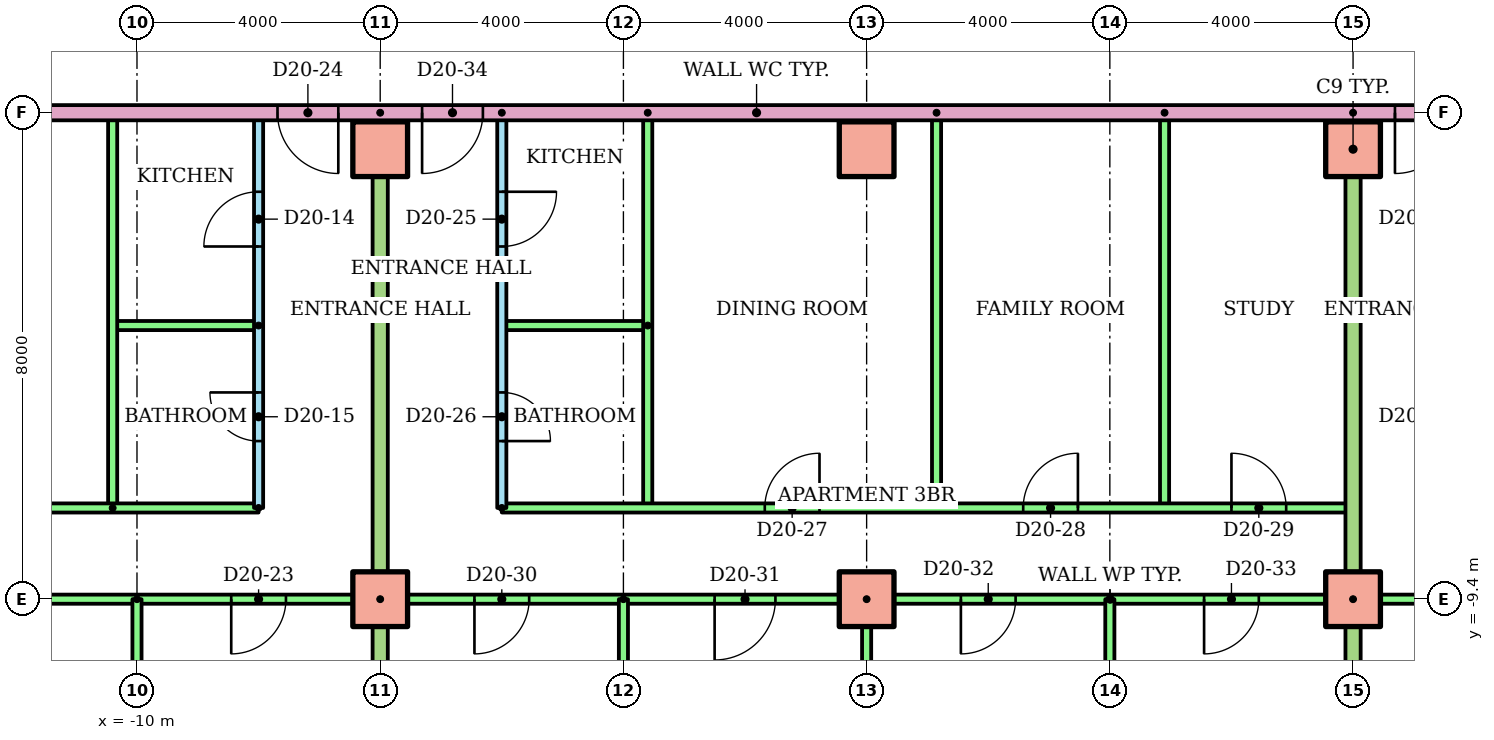
"""IFC4 building model, lengths in metres.
Left out: names, types, materials, properties, quantities, classifications, styles, units other than length and angle.
Written with IfcOpenShell. Run it as: python <this file> out.ifc"""

import sys

from ifc_helpers import new_model, si_unit, direction, frame, frame_2d, origin, origin_2d, place, context, subcontext, project, spatial, rectangle, extrude, element, fill, save


model = new_model("IFC4")
c1 = context("Model", 3, precision=1e-05, world=origin(), true_north=direction((0.0, 1.0)))
c2 = subcontext(c1, "Body", "Model", "MODEL_VIEW")
j1 = project(units=[si_unit("LENGTHUNIT", "METRE"), si_unit("PLANEANGLEUNIT", "RADIAN")], contexts=[c1])
p1 = place(None, origin())
s1 = spatial("IfcSite", under=j1, at=p1, CompositionType="ELEMENT")
p2 = place(p1, origin())
s2 = spatial("IfcBuilding", under=s1, at=p2, CompositionType="ELEMENT")
p3 = place(p2, frame((0.0, 0.0, 80.7)))
s3 = spatial("IfcBuildingStorey", under=s2, at=p3, CompositionType="ELEMENT", Elevation=80.7)
for number, where in (
    (1, (-6.0, -9.4, 0.0)),
    (2, (2.0, -9.4, 0.0)),
    (3, (10.0, -9.4, 0.0)),
    (4, (-6.0, -2.0, 0.0)),
    (5, (2.0, -2.0, 0.0)),
    (6, (10.0, -2.0, 0.0)),
):
    element("IfcColumn", number, at=place(p3, frame(where)), inside=s3, PredefinedType="COLUMN", context=c2, shape_type="SweptSolid", body=[
        extrude(rectangle(XDim=0.9, YDim=0.9, at=origin_2d()), origin(), (0.0, 0.0, 1.0), 3.2),
    ])
p4 = place(p3, frame((-8.0, -7.9, 0.0), z_axis=(0.0, 0.0, 1.0), x_axis=(0.0, 1.0, 0.0)))
e7 = element("IfcWall", 7, at=p4, inside=s3, PredefinedType="PARTITIONING", context=c2, shape_type="SweptSolid", body=[
    extrude(rectangle(XDim=6.5, YDim=0.15, at=frame_2d((3.25, 0.0))), origin(), (0.0, 0.0, 1.0), 2.4),
])
p5 = place(p4, frame((4.3, 0.0, 0.0)))
e8 = element("IfcOpeningElement", 8, at=p5, cuts=e7, PredefinedType="OPENING", context=c2, shape_type="SweptSolid", body=[
    extrude(rectangle(XDim=0.9, YDim=2.1, at=frame_2d((0.45, 1.05))), frame((0.0, 0.085, 0.0), z_axis=(0.0, -1.0, 0.0), x_axis=(1.0, 0.0, 0.0)), (0.0, 0.0, 1.0), 0.17),
])
p6 = place(p4, frame((1.1, 0.0, 0.0)))
e9 = element("IfcOpeningElement", 9, at=p6, cuts=e7, PredefinedType="OPENING", context=c2, shape_type="SweptSolid", body=[
    extrude(rectangle(XDim=0.8, YDim=2.1, at=frame_2d((0.4, 1.05))), frame((0.0, 0.085, 0.0), z_axis=(0.0, -1.0, 0.0), x_axis=(1.0, 0.0, 0.0)), (0.0, 0.0, 1.0), 0.17),
])
p7 = place(p3, frame((-8.0, -4.9, 0.0), z_axis=(0.0, 0.0, 1.0), x_axis=(-1.0, 0.0, 0.0)))
e10 = element("IfcWall", 10, at=p7, inside=s3, PredefinedType="PARTITIONING", context=c2, shape_type="SweptSolid", body=[
    extrude(rectangle(XDim=2.4, YDim=0.15, at=frame_2d((1.2, 0.0))), origin(), (0.0, 0.0, 1.0), 2.4),
])
p8 = place(p3, frame((-10.4, -7.9, 0.0), z_axis=(0.0, 0.0, 1.0), x_axis=(0.0, 1.0, 0.0)))
e11 = element("IfcWall", 11, at=p8, inside=s3, PredefinedType="PARTITIONING", context=c2, shape_type="SweptSolid", body=[
    extrude(rectangle(XDim=6.5, YDim=0.15, at=frame_2d((3.25, 0.0))), origin(), (0.0, 0.0, 1.0), 2.4),
])
p9 = place(p3, frame((-28.61, -7.9, 0.0)))
e12 = element("IfcWall", 12, at=p9, inside=s3, PredefinedType="PARTITIONING", context=c2, shape_type="SweptSolid", body=[
    extrude(rectangle(XDim=20.61, YDim=0.15, at=frame_2d((10.305, 0.0))), origin(), (0.0, 0.0, 1.0), 2.4),
])
p10 = place(p9, frame((13.021, 0.0, 0.0)))
e13 = element("IfcOpeningElement", 13, at=p10, cuts=e12, PredefinedType="OPENING", context=c2, shape_type="SweptSolid", body=[
    extrude(rectangle(XDim=0.9, YDim=2.1, at=frame_2d((0.45, 1.05))), frame((0.0, 0.085, 0.0), z_axis=(0.0, -1.0, 0.0), x_axis=(1.0, 0.0, 0.0)), (0.0, 0.0, 1.0), 0.17),
])
p11 = place(p9, frame((7.299, 0.0, 0.0)))
e14 = element("IfcOpeningElement", 14, at=p11, cuts=e12, PredefinedType="OPENING", context=c2, shape_type="SweptSolid", body=[
    extrude(rectangle(XDim=0.9, YDim=2.1, at=frame_2d((0.45, 1.05))), frame((0.0, 0.085, 0.0), z_axis=(0.0, -1.0, 0.0), x_axis=(1.0, 0.0, 0.0)), (0.0, 0.0, 1.0), 0.17),
])
p12 = place(p9, frame((2.01, 0.0, 0.0)))
e15 = element("IfcOpeningElement", 15, at=p12, cuts=e12, PredefinedType="OPENING", context=c2, shape_type="SweptSolid", body=[
    extrude(rectangle(XDim=0.9, YDim=2.1, at=frame_2d((0.45, 1.05))), frame((0.0, 0.085, 0.0), z_axis=(0.0, -1.0, 0.0), x_axis=(1.0, 0.0, 0.0)), (0.0, 0.0, 1.0), 0.17),
])
p13 = place(p3, frame((-6.0, -9.4, 0.0), z_axis=(0.0, 0.0, 1.0), x_axis=(-1.0, 0.0, 0.0)))
e16 = element("IfcWall", 16, at=p13, inside=s3, PredefinedType="PARTITIONING", context=c2, shape_type="SweptSolid", body=[
    extrude(rectangle(XDim=22.61, YDim=0.15, at=frame_2d((11.305, 0.0))), origin(), (0.0, 0.0, 1.0), 2.4),
])
p14 = place(p13, frame((19.7, 0.0, 0.0)))
e17 = element("IfcOpeningElement", 17, at=p14, cuts=e16, PredefinedType="OPENING", context=c2, shape_type="SweptSolid", body=[
    extrude(rectangle(XDim=0.9, YDim=2.1, at=frame_2d((0.45, 1.05))), frame((0.0, 0.085, 0.0), z_axis=(0.0, -1.0, 0.0), x_axis=(1.0, 0.0, 0.0)), (0.0, 0.0, 1.0), 0.17),
])
p15 = place(p13, frame((14.411, 0.0, 0.0)))
e18 = element("IfcOpeningElement", 18, at=p15, cuts=e16, PredefinedType="OPENING", context=c2, shape_type="SweptSolid", body=[
    extrude(rectangle(XDim=0.9, YDim=2.1, at=frame_2d((0.45, 1.05))), frame((0.0, 0.085, 0.0), z_axis=(0.0, -1.0, 0.0), x_axis=(1.0, 0.0, 0.0)), (0.0, 0.0, 1.0), 0.17),
])
p16 = place(p13, frame((9.5, 0.0, 0.0)))
e19 = element("IfcOpeningElement", 19, at=p16, cuts=e16, PredefinedType="OPENING", context=c2, shape_type="SweptSolid", body=[
    extrude(rectangle(XDim=1.0, YDim=2.1, at=frame_2d((0.5, 1.05))), frame((0.0, 0.085, 0.0), z_axis=(0.0, -1.0, 0.0), x_axis=(1.0, 0.0, 0.0)), (0.0, 0.0, 1.0), 0.17),
])
p17 = place(p13, frame((5.55, 0.0, 0.0)))
e20 = element("IfcOpeningElement", 20, at=p17, cuts=e16, PredefinedType="OPENING", context=c2, shape_type="SweptSolid", body=[
    extrude(rectangle(XDim=0.9, YDim=2.1, at=frame_2d((0.45, 1.05))), frame((0.0, 0.085, 0.0), z_axis=(0.0, -1.0, 0.0), x_axis=(1.0, 0.0, 0.0)), (0.0, 0.0, 1.0), 0.17),
])
p18 = place(p13, frame((1.55, 0.0, 0.0)))
e21 = element("IfcOpeningElement", 21, at=p18, cuts=e16, PredefinedType="OPENING", context=c2, shape_type="SweptSolid", body=[
    extrude(rectangle(XDim=0.9, YDim=2.1, at=frame_2d((0.45, 1.05))), frame((0.0, 0.085, 0.0), z_axis=(0.0, -1.0, 0.0), x_axis=(1.0, 0.0, 0.0)), (0.0, 0.0, 1.0), 0.17),
])
p19 = place(p3, frame((-10.0, -9.4, 0.0), z_axis=(0.0, 0.0, 1.0), x_axis=(0.0, -1.0, 0.0)))
e22 = element("IfcWall", 22, at=p19, inside=s3, PredefinedType="PARTITIONING", context=c2, shape_type="SweptSolid", body=[
    extrude(rectangle(XDim=6.821, YDim=0.15, at=frame_2d((3.411, 0.0))), origin(), (0.0, 0.0, 1.0), 2.4),
])
p20 = place(p3, frame((-4.0, -1.4, 0.0), z_axis=(0.0, 0.0, 1.0), x_axis=(0.0, -1.0, 0.0)))
e23 = element("IfcWall", 23, at=p20, inside=s3, PredefinedType="PARTITIONING", context=c2, shape_type="SweptSolid", body=[
    extrude(rectangle(XDim=6.5, YDim=0.15, at=frame_2d((3.25, 0.0))), origin(), (0.0, 0.0, 1.0), 2.4),
])
p21 = place(p20, frame((1.3, 0.0, 0.0)))
e24 = element("IfcOpeningElement", 24, at=p21, cuts=e23, PredefinedType="OPENING", context=c2, shape_type="SweptSolid", body=[
    extrude(rectangle(XDim=0.9, YDim=2.1, at=frame_2d((0.45, 1.05))), frame((0.0, 0.085, 0.0), z_axis=(0.0, -1.0, 0.0), x_axis=(1.0, 0.0, 0.0)), (0.0, 0.0, 1.0), 0.17),
])
p22 = place(p20, frame((4.6, 0.0, 0.0)))
e25 = element("IfcOpeningElement", 25, at=p22, cuts=e23, PredefinedType="OPENING", context=c2, shape_type="SweptSolid", body=[
    extrude(rectangle(XDim=0.8, YDim=2.1, at=frame_2d((0.4, 1.05))), frame((0.0, 0.085, 0.0), z_axis=(0.0, -1.0, 0.0), x_axis=(1.0, 0.0, 0.0)), (0.0, 0.0, 1.0), 0.17),
])
p23 = place(p3, frame((-1.6, -4.9, 0.0), z_axis=(0.0, 0.0, 1.0), x_axis=(-1.0, 0.0, 0.0)))
e26 = element("IfcWall", 26, at=p23, inside=s3, PredefinedType="PARTITIONING", context=c2, shape_type="SweptSolid", body=[
    extrude(rectangle(XDim=2.4, YDim=0.15, at=frame_2d((1.2, 0.0))), origin(), (0.0, 0.0, 1.0), 2.4),
])
for number, where, z_axis, x_axis in (
    (27, (-1.6, -1.4, 0.0), (0.0, 0.0, 1.0), (0.0, -1.0, 0.0)),
    (28, (3.15, -1.4, 0.0), (0.0, 0.0, 1.0), (0.0, -1.0, 0.0)),
    (29, (6.9, -1.4, 0.0), (0.0, 0.0, 1.0), (0.0, -1.0, 0.0)),
):
    element("IfcWall", number, at=place(p3, frame(where, z_axis=z_axis, x_axis=x_axis)), inside=s3, PredefinedType="PARTITIONING", context=c2, shape_type="SweptSolid", body=[
        extrude(rectangle(XDim=6.5, YDim=0.15, at=frame_2d((3.25, 0.0))), origin(), (0.0, 0.0, 1.0), 2.4),
    ])
p24 = place(p3, frame((-4.0, -7.9, 0.0)))
e30 = element("IfcWall", 30, at=p24, inside=s3, PredefinedType="PARTITIONING", context=c2, shape_type="SweptSolid", body=[
    extrude(rectangle(XDim=14.0, YDim=0.15, at=frame_2d((7.0, 0.0))), origin(), (0.0, 0.0, 1.0), 2.4),
])
p25 = place(p24, frame((4.325, 0.0, 0.0)))
e31 = element("IfcOpeningElement", 31, at=p25, cuts=e30, PredefinedType="OPENING", context=c2, shape_type="SweptSolid", body=[
    extrude(rectangle(XDim=0.9, YDim=2.1, at=frame_2d((0.45, 1.05))), frame((0.0, 0.085, 0.0), z_axis=(0.0, -1.0, 0.0), x_axis=(1.0, 0.0, 0.0)), (0.0, 0.0, 1.0), 0.17),
])
p26 = place(p24, frame((8.575, 0.0, 0.0)))
e32 = element("IfcOpeningElement", 32, at=p26, cuts=e30, PredefinedType="OPENING", context=c2, shape_type="SweptSolid", body=[
    extrude(rectangle(XDim=0.9, YDim=2.1, at=frame_2d((0.45, 1.05))), frame((0.0, 0.085, 0.0), z_axis=(0.0, -1.0, 0.0), x_axis=(1.0, 0.0, 0.0)), (0.0, 0.0, 1.0), 0.17),
])
p27 = place(p24, frame((12.0, 0.0, 0.0)))
e33 = element("IfcOpeningElement", 33, at=p27, cuts=e30, PredefinedType="OPENING", context=c2, shape_type="SweptSolid", body=[
    extrude(rectangle(XDim=0.9, YDim=2.1, at=frame_2d((0.45, 1.05))), frame((0.0, 0.085, 0.0), z_axis=(0.0, -1.0, 0.0), x_axis=(1.0, 0.0, 0.0)), (0.0, 0.0, 1.0), 0.17),
])
p28 = place(p3, frame((10.0, -9.4, 0.0), z_axis=(0.0, 0.0, 1.0), x_axis=(-1.0, 0.0, 0.0)))
e34 = element("IfcWall", 34, at=p28, inside=s3, PredefinedType="PARTITIONING", context=c2, shape_type="SweptSolid", body=[
    extrude(rectangle(XDim=16.0, YDim=0.15, at=frame_2d((8.0, 0.0))), origin(), (0.0, 0.0, 1.0), 2.4),
])
p29 = place(p28, frame((13.55, 0.0, 0.0)))
e35 = element("IfcOpeningElement", 35, at=p29, cuts=e34, PredefinedType="OPENING", context=c2, shape_type="SweptSolid", body=[
    extrude(rectangle(XDim=0.9, YDim=2.1, at=frame_2d((0.45, 1.05))), frame((0.0, 0.085, 0.0), z_axis=(0.0, -1.0, 0.0), x_axis=(1.0, 0.0, 0.0)), (0.0, 0.0, 1.0), 0.17),
])
p30 = place(p28, frame((9.5, 0.0, 0.0)))
e36 = element("IfcOpeningElement", 36, at=p30, cuts=e34, PredefinedType="OPENING", context=c2, shape_type="SweptSolid", body=[
    extrude(rectangle(XDim=1.0, YDim=2.1, at=frame_2d((0.5, 1.05))), frame((0.0, 0.085, 0.0), z_axis=(0.0, -1.0, 0.0), x_axis=(1.0, 0.0, 0.0)), (0.0, 0.0, 1.0), 0.17),
])
p31 = place(p28, frame((5.55, 0.0, 0.0)))
e37 = element("IfcOpeningElement", 37, at=p31, cuts=e34, PredefinedType="OPENING", context=c2, shape_type="SweptSolid", body=[
    extrude(rectangle(XDim=0.9, YDim=2.1, at=frame_2d((0.45, 1.05))), frame((0.0, 0.085, 0.0), z_axis=(0.0, -1.0, 0.0), x_axis=(1.0, 0.0, 0.0)), (0.0, 0.0, 1.0), 0.17),
])
p32 = place(p28, frame((1.55, 0.0, 0.0)))
e38 = element("IfcOpeningElement", 38, at=p32, cuts=e34, PredefinedType="OPENING", context=c2, shape_type="SweptSolid", body=[
    extrude(rectangle(XDim=0.9, YDim=2.1, at=frame_2d((0.45, 1.05))), frame((0.0, 0.085, 0.0), z_axis=(0.0, -1.0, 0.0), x_axis=(1.0, 0.0, 0.0)), (0.0, 0.0, 1.0), 0.17),
])
p33 = place(p3, frame((-2.0, -9.4, 0.0), z_axis=(0.0, 0.0, 1.0), x_axis=(0.0, -1.0, 0.0)))
e39 = element("IfcWall", 39, at=p33, inside=s3, PredefinedType="PARTITIONING", context=c2, shape_type="SweptSolid", body=[
    extrude(rectangle(XDim=6.821, YDim=0.15, at=frame_2d((3.411, 0.0))), origin(), (0.0, 0.0, 1.0), 2.4),
])
p34 = place(p3, frame((2.0, -9.4, 0.0), z_axis=(0.0, 0.0, 1.0), x_axis=(0.0, -1.0, 0.0)))
e40 = element("IfcWall", 40, at=p34, inside=s3, PredefinedType="PARTITIONING", context=c2, shape_type="SweptSolid", body=[
    extrude(rectangle(XDim=6.81, YDim=0.15, at=frame_2d((3.405, 0.0))), origin(), (0.0, 0.0, 1.0), 2.4),
])
p35 = place(p3, frame((6.0, -9.4, 0.0), z_axis=(0.0, 0.0, 1.0), x_axis=(0.0, -1.0, 0.0)))
e41 = element("IfcWall", 41, at=p35, inside=s3, PredefinedType="PARTITIONING", context=c2, shape_type="SweptSolid", body=[
    extrude(rectangle(XDim=6.821, YDim=0.15, at=frame_2d((3.411, 0.0))), origin(), (0.0, 0.0, 1.0), 2.4),
])
p36 = place(p3, frame((-6.0, -1.4, 0.0), z_axis=(0.0, 0.0, 1.0), x_axis=(0.0, -1.0, 0.0)))
e42 = element("IfcWall", 42, at=p36, inside=s3, PredefinedType="PARTITIONING", context=c2, shape_type="SweptSolid", body=[
    extrude(rectangle(XDim=14.81, YDim=0.25, at=frame_2d((7.405, 0.0))), origin(), (0.0, 0.0, 1.0), 2.4),
])
p37 = place(p3, frame((26.0, -9.4, 0.0), z_axis=(0.0, 0.0, 1.0), x_axis=(-1.0, 0.0, 0.0)))
e43 = element("IfcWall", 43, at=p37, inside=s3, PredefinedType="PARTITIONING", context=c2, shape_type="SweptSolid", body=[
    extrude(rectangle(XDim=16.0, YDim=0.15, at=frame_2d((8.0, 0.0))), origin(), (0.0, 0.0, 1.0), 2.4),
])
p38 = place(p37, frame((13.55, 0.0, 0.0)))
e44 = element("IfcOpeningElement", 44, at=p38, cuts=e43, PredefinedType="OPENING", context=c2, shape_type="SweptSolid", body=[
    extrude(rectangle(XDim=0.9, YDim=2.1, at=frame_2d((0.45, 1.05))), frame((0.0, 0.085, 0.0), z_axis=(0.0, -1.0, 0.0), x_axis=(1.0, 0.0, 0.0)), (0.0, 0.0, 1.0), 0.17),
])
p39 = place(p37, frame((9.55, 0.0, 0.0)))
e45 = element("IfcOpeningElement", 45, at=p39, cuts=e43, PredefinedType="OPENING", context=c2, shape_type="SweptSolid", body=[
    extrude(rectangle(XDim=0.9, YDim=2.1, at=frame_2d((0.45, 1.05))), frame((0.0, 0.085, 0.0), z_axis=(0.0, -1.0, 0.0), x_axis=(1.0, 0.0, 0.0)), (0.0, 0.0, 1.0), 0.17),
])
p40 = place(p37, frame((3.5, 0.0, 0.0)))
e46 = element("IfcOpeningElement", 46, at=p40, cuts=e43, PredefinedType="OPENING", context=c2, shape_type="SweptSolid", body=[
    extrude(rectangle(XDim=1.0, YDim=2.1, at=frame_2d((0.5, 1.05))), frame((0.0, 0.085, 0.0), z_axis=(0.0, -1.0, 0.0), x_axis=(1.0, 0.0, 0.0)), (0.0, 0.0, 1.0), 0.17),
])
p41 = place(p3, frame((10.0, -1.4, 0.0), z_axis=(0.0, 0.0, 1.0), x_axis=(0.0, -1.0, 0.0)))
e47 = element("IfcWall", 47, at=p41, inside=s3, PredefinedType="PARTITIONING", context=c2, shape_type="SweptSolid", body=[
    extrude(rectangle(XDim=14.81, YDim=0.25, at=frame_2d((7.405, 0.0))), origin(), (0.0, 0.0, 1.0), 2.4),
])
p42 = place(p3, frame((14.0, -1.4, 0.0), z_axis=(0.0, 0.0, 1.0), x_axis=(-1.0, 0.0, 0.0)))
e48 = element("IfcWall", 48, at=p42, inside=s3, PredefinedType="PARTITIONING", context=c2, shape_type="SweptSolid", body=[
    extrude(rectangle(XDim=28.0, YDim=0.25, at=frame_2d((14.0, 0.0))), origin(), (0.0, 0.0, 1.0), 2.4),
])
p43 = place(p42, frame((20.689, 0.0, 0.0)))
e49 = element("IfcOpeningElement", 49, at=p43, cuts=e48, PredefinedType="OPENING", context=c2, shape_type="SweptSolid", body=[
    extrude(rectangle(XDim=1.0, YDim=2.1, at=frame_2d((0.5, 1.05))), frame((0.0, 0.135, 0.0), z_axis=(0.0, -1.0, 0.0), x_axis=(1.0, 0.0, 0.0)), (0.0, 0.0, 1.0), 0.27),
])
p44 = place(p42, frame((18.311, 0.0, 0.0)))
e50 = element("IfcOpeningElement", 50, at=p44, cuts=e48, PredefinedType="OPENING", context=c2, shape_type="SweptSolid", body=[
    extrude(rectangle(XDim=1.0, YDim=2.1, at=frame_2d((0.5, 1.05))), frame((0.0, 0.135, 0.0), z_axis=(0.0, -1.0, 0.0), x_axis=(1.0, 0.0, 0.0)), (0.0, 0.0, 1.0), 0.27),
])
p45 = place(p42, frame((2.311, 0.0, 0.0)))
e51 = element("IfcOpeningElement", 51, at=p45, cuts=e48, PredefinedType="OPENING", context=c2, shape_type="SweptSolid", body=[
    extrude(rectangle(XDim=1.0, YDim=2.1, at=frame_2d((0.5, 1.05))), frame((0.0, 0.135, 0.0), z_axis=(0.0, -1.0, 0.0), x_axis=(1.0, 0.0, 0.0)), (0.0, 0.0, 1.0), 0.27),
])
p46 = place(p5, origin())
e52 = element("IfcDoor", 52, at=p46, inside=s3, OperationType="SINGLE_SWING_LEFT", PredefinedType="DOOR", context=c2, shape_type="SweptSolid", body=[
    extrude(rectangle(XDim=0.9, YDim=2.1, at=frame_2d((0.45, 1.05))), frame((0.0, 0.025, 0.0), z_axis=(0.0, -1.0, 0.0), x_axis=(1.0, 0.0, 0.0)), (0.0, 0.0, 1.0), 0.05),
])
fill(e8, e52)
p47 = place(p6, origin())
e53 = element("IfcDoor", 53, at=p47, inside=s3, OperationType="SINGLE_SWING_RIGHT", PredefinedType="DOOR", context=c2, shape_type="SweptSolid", body=[
    extrude(rectangle(XDim=0.8, YDim=2.1, at=frame_2d((0.4, 1.05))), frame((0.0, 0.025, 0.0), z_axis=(0.0, -1.0, 0.0), x_axis=(1.0, 0.0, 0.0)), (0.0, 0.0, 1.0), 0.05),
])
fill(e9, e53)
p48 = place(p18, origin())
e54 = element("IfcDoor", 54, at=p48, inside=s3, OperationType="SINGLE_SWING_RIGHT", PredefinedType="DOOR", context=c2, shape_type="SweptSolid", body=[
    extrude(rectangle(XDim=0.9, YDim=2.1, at=frame_2d((0.45, 1.05))), frame((0.0, 0.025, 0.0), z_axis=(0.0, -1.0, 0.0), x_axis=(1.0, 0.0, 0.0)), (0.0, 0.0, 1.0), 0.05),
])
fill(e21, e54)
p49 = place(p43, origin())
e55 = element("IfcDoor", 55, at=p49, inside=s3, OperationType="SINGLE_SWING_LEFT", PredefinedType="DOOR", context=c2, shape_type="SweptSolid", body=[
    extrude(rectangle(XDim=1.0, YDim=2.1, at=frame_2d((0.5, 1.05))), frame((0.0, 0.025, 0.0), z_axis=(0.0, -1.0, 0.0), x_axis=(1.0, 0.0, 0.0)), (0.0, 0.0, 1.0), 0.05),
])
fill(e49, e55)
p50 = place(p21, origin())
e56 = element("IfcDoor", 56, at=p50, inside=s3, OperationType="SINGLE_SWING_LEFT", PredefinedType="DOOR", context=c2, shape_type="SweptSolid", body=[
    extrude(rectangle(XDim=0.9, YDim=2.1, at=frame_2d((0.45, 1.05))), frame((0.0, 0.025, 0.0), z_axis=(0.0, -1.0, 0.0), x_axis=(1.0, 0.0, 0.0)), (0.0, 0.0, 1.0), 0.05),
])
fill(e24, e56)
p51 = place(p22, origin())
e57 = element("IfcDoor", 57, at=p51, inside=s3, OperationType="SINGLE_SWING_RIGHT", PredefinedType="DOOR", context=c2, shape_type="SweptSolid", body=[
    extrude(rectangle(XDim=0.8, YDim=2.1, at=frame_2d((0.4, 1.05))), frame((0.0, 0.025, 0.0), z_axis=(0.0, -1.0, 0.0), x_axis=(1.0, 0.0, 0.0)), (0.0, 0.0, 1.0), 0.05),
])
fill(e25, e57)
p52 = place(p25, origin())
e58 = element("IfcDoor", 58, at=p52, inside=s3, OperationType="SINGLE_SWING_RIGHT", PredefinedType="DOOR", context=c2, shape_type="SweptSolid", body=[
    extrude(rectangle(XDim=0.9, YDim=2.1, at=frame_2d((0.45, 1.05))), frame((0.0, 0.025, 0.0), z_axis=(0.0, -1.0, 0.0), x_axis=(1.0, 0.0, 0.0)), (0.0, 0.0, 1.0), 0.05),
])
fill(e31, e58)
p53 = place(p26, origin())
e59 = element("IfcDoor", 59, at=p53, inside=s3, OperationType="SINGLE_SWING_RIGHT", PredefinedType="DOOR", context=c2, shape_type="SweptSolid", body=[
    extrude(rectangle(XDim=0.9, YDim=2.1, at=frame_2d((0.45, 1.05))), frame((0.0, 0.025, 0.0), z_axis=(0.0, -1.0, 0.0), x_axis=(1.0, 0.0, 0.0)), (0.0, 0.0, 1.0), 0.05),
])
fill(e32, e59)
p54 = place(p27, origin())
e60 = element("IfcDoor", 60, at=p54, inside=s3, OperationType="SINGLE_SWING_LEFT", PredefinedType="DOOR", context=c2, shape_type="SweptSolid", body=[
    extrude(rectangle(XDim=0.9, YDim=2.1, at=frame_2d((0.45, 1.05))), frame((0.0, 0.025, 0.0), z_axis=(0.0, -1.0, 0.0), x_axis=(1.0, 0.0, 0.0)), (0.0, 0.0, 1.0), 0.05),
])
fill(e33, e60)
p55 = place(p29, origin())
e61 = element("IfcDoor", 61, at=p55, inside=s3, OperationType="SINGLE_SWING_RIGHT", PredefinedType="DOOR", context=c2, shape_type="SweptSolid", body=[
    extrude(rectangle(XDim=0.9, YDim=2.1, at=frame_2d((0.45, 1.05))), frame((0.0, 0.025, 0.0), z_axis=(0.0, -1.0, 0.0), x_axis=(1.0, 0.0, 0.0)), (0.0, 0.0, 1.0), 0.05),
])
fill(e35, e61)
p56 = place(p30, origin())
e62 = element("IfcDoor", 62, at=p56, inside=s3, OperationType="SINGLE_SWING_RIGHT", PredefinedType="DOOR", context=c2, shape_type="SweptSolid", body=[
    extrude(rectangle(XDim=1.0, YDim=2.1, at=frame_2d((0.5, 1.05))), frame((0.0, 0.025, 0.0), z_axis=(0.0, -1.0, 0.0), x_axis=(1.0, 0.0, 0.0)), (0.0, 0.0, 1.0), 0.05),
])
fill(e36, e62)
p57 = place(p31, origin())
e63 = element("IfcDoor", 63, at=p57, inside=s3, OperationType="SINGLE_SWING_RIGHT", PredefinedType="DOOR", context=c2, shape_type="SweptSolid", body=[
    extrude(rectangle(XDim=0.9, YDim=2.1, at=frame_2d((0.45, 1.05))), frame((0.0, 0.025, 0.0), z_axis=(0.0, -1.0, 0.0), x_axis=(1.0, 0.0, 0.0)), (0.0, 0.0, 1.0), 0.05),
])
fill(e37, e63)
p58 = place(p32, origin())
e64 = element("IfcDoor", 64, at=p58, inside=s3, OperationType="SINGLE_SWING_RIGHT", PredefinedType="DOOR", context=c2, shape_type="SweptSolid", body=[
    extrude(rectangle(XDim=0.9, YDim=2.1, at=frame_2d((0.45, 1.05))), frame((0.0, 0.025, 0.0), z_axis=(0.0, -1.0, 0.0), x_axis=(1.0, 0.0, 0.0)), (0.0, 0.0, 1.0), 0.05),
])
fill(e38, e64)
p59 = place(p44, origin())
e65 = element("IfcDoor", 65, at=p59, inside=s3, OperationType="SINGLE_SWING_RIGHT", PredefinedType="DOOR", context=c2, shape_type="SweptSolid", body=[
    extrude(rectangle(XDim=1.0, YDim=2.1, at=frame_2d((0.5, 1.05))), frame((0.0, 0.025, 0.0), z_axis=(0.0, -1.0, 0.0), x_axis=(1.0, 0.0, 0.0)), (0.0, 0.0, 1.0), 0.05),
])
fill(e50, e65)
p60 = place(p45, origin())
e66 = element("IfcDoor", 66, at=p60, inside=s3, OperationType="SINGLE_SWING_RIGHT", PredefinedType="DOOR", context=c2, shape_type="SweptSolid", body=[
    extrude(rectangle(XDim=1.0, YDim=2.1, at=frame_2d((0.5, 1.05))), frame((0.0, 0.025, 0.0), z_axis=(0.0, -1.0, 0.0), x_axis=(1.0, 0.0, 0.0)), (0.0, 0.0, 1.0), 0.05),
])
fill(e51, e66)
save(model, sys.argv[1])
